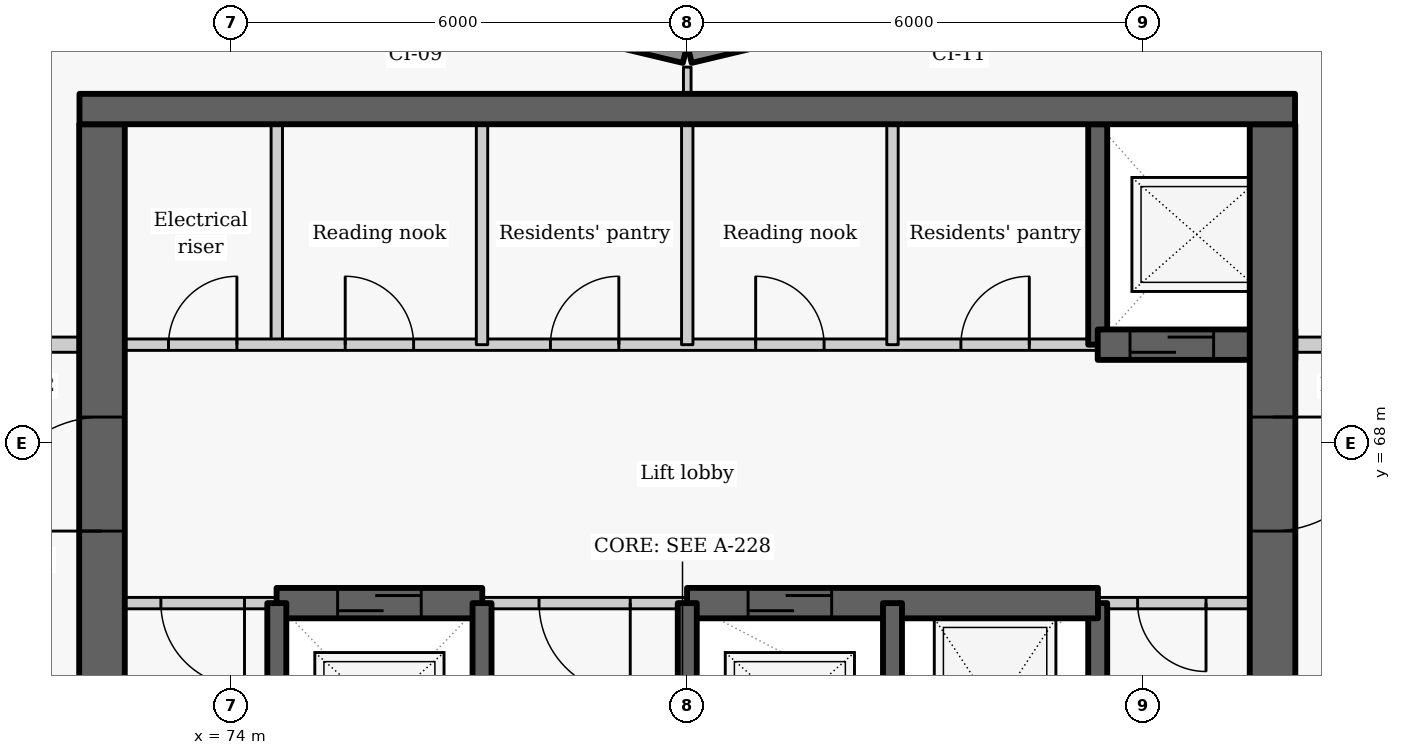
"""IFC4 building model, lengths in metres.
Left out: names, types, materials, properties, quantities, classifications, styles, units other than length and angle.
Written with IfcOpenShell. Run it as: python <this file> out.ifc"""

import sys

from ifc_helpers import new_model, si_unit, direction, frame, frame_2d, origin, place, context, subcontext, project, spatial, rectangle, extrude, element, fill, save


model = new_model("IFC4")
c1 = context("Model", 3, precision=1e-05, world=origin(), true_north=direction((0.0, 1.0)))
c2 = subcontext(c1, "Body", "Model", "MODEL_VIEW")
j1 = project(units=[si_unit("LENGTHUNIT", "METRE"), si_unit("PLANEANGLEUNIT", "RADIAN")], contexts=[c1])
p1 = place(None, origin())
s1 = spatial("IfcSite", under=j1, at=p1, CompositionType="ELEMENT")
p2 = place(p1, origin())
s2 = spatial("IfcBuilding", under=s1, at=p2, CompositionType="ELEMENT")
p3 = place(p2, frame((0.0, 0.0, 160.2)))
s3 = spatial("IfcBuildingStorey", under=s2, at=p3, CompositionType="ELEMENT", Elevation=160.2)
p4 = place(p3, frame((83.186, 73.881, 0.0), z_axis=(0.0, 0.0, 1.0), x_axis=(-0.972773113459, -0.231759508395, 0.0)))
e1 = element("IfcWall", 1, at=p4, inside=s3, PredefinedType="SOLIDWALL", context=c2, shape_type="SweptSolid", body=[
    extrude(rectangle(XDim=3.246, YDim=0.25, at=frame_2d((1.623, 0.0))), origin(), (0.0, 0.0, 1.0), 2.425),
])
p5 = place(p4, frame((0.573, 0.0, 0.9)))
e2 = element("IfcOpeningElement", 2, at=p5, cuts=e1, PredefinedType="OPENING", context=c2, shape_type="SweptSolid", body=[
    extrude(rectangle(XDim=2.1, YDim=1.1, at=frame_2d((1.05, 0.55))), frame((0.0, 0.135, 0.0), z_axis=(0.0, -1.0, 0.0), x_axis=(1.0, 0.0, 0.0)), (0.0, 0.0, 1.0), 0.27),
])
p6 = place(p3, frame((79.971, 73.128, 0.0), z_axis=(0.0, 0.0, 1.0), x_axis=(-0.972773113459, 0.231759508395, 0.0)))
e3 = element("IfcWall", 3, at=p6, inside=s3, PredefinedType="SOLIDWALL", context=c2, shape_type="SweptSolid", body=[
    extrude(rectangle(XDim=3.246, YDim=0.25, at=frame_2d((1.623, 0.0))), origin(), (0.0, 0.0, 1.0), 2.425),
])
p7 = place(p6, frame((0.573, 0.0, 0.9)))
e4 = element("IfcOpeningElement", 4, at=p7, cuts=e3, PredefinedType="OPENING", context=c2, shape_type="SweptSolid", body=[
    extrude(rectangle(XDim=2.1, YDim=1.1, at=frame_2d((1.05, 0.55))), frame((0.0, 0.135, 0.0), z_axis=(0.0, -1.0, 0.0), x_axis=(1.0, 0.0, 0.0)), (0.0, 0.0, 1.0), 0.27),
])
p8 = place(p3, frame((74.6, 69.3, 0.0), z_axis=(0.0, 0.0, 1.0), x_axis=(0.0, 1.0, 0.0)))
e5 = element("IfcWall", 5, at=p8, inside=s3, PredefinedType="PARTITIONING", context=c2, shape_type="SweptSolid", body=[
    extrude(rectangle(XDim=2.9, YDim=0.15, at=frame_2d((1.45, 0.0))), origin(), (0.0, 0.0, 1.0), 3.025),
])
p9 = place(p3, frame((72.0, 69.3, 0.0), z_axis=(0.0, 0.0, 1.0), x_axis=(1.0, 0.0, 0.0)))
e6 = element("IfcWall", 6, at=p9, inside=s3, PredefinedType="PARTITIONING", context=c2, shape_type="SweptSolid", body=[
    extrude(rectangle(XDim=13.4, YDim=0.15, at=frame_2d((6.7, 0.0))), origin(), (0.0, 0.0, 1.0), 3.025),
])
p10 = place(p9, frame((1.175, 0.0, 0.0)))
e7 = element("IfcOpeningElement", 7, at=p10, cuts=e6, PredefinedType="OPENING", context=c2, shape_type="SweptSolid", body=[
    extrude(rectangle(XDim=0.9, YDim=2.1, at=frame_2d((0.45, 1.05))), frame((0.0, 0.085, 0.0), z_axis=(0.0, -1.0, 0.0), x_axis=(1.0, 0.0, 0.0)), (0.0, 0.0, 1.0), 0.17),
])
p11 = place(p9, frame((3.5, 0.0, 0.0)))
e8 = element("IfcOpeningElement", 8, at=p11, cuts=e6, PredefinedType="OPENING", context=c2, shape_type="SweptSolid", body=[
    extrude(rectangle(XDim=0.9, YDim=2.1, at=frame_2d((0.45, 1.05))), frame((0.0, 0.085, 0.0), z_axis=(0.0, -1.0, 0.0), x_axis=(1.0, 0.0, 0.0)), (0.0, 0.0, 1.0), 0.17),
])
p12 = place(p9, frame((6.2, 0.0, 0.0)))
e9 = element("IfcOpeningElement", 9, at=p12, cuts=e6, PredefinedType="OPENING", context=c2, shape_type="SweptSolid", body=[
    extrude(rectangle(XDim=0.9, YDim=2.1, at=frame_2d((0.45, 1.05))), frame((0.0, 0.085, 0.0), z_axis=(0.0, -1.0, 0.0), x_axis=(1.0, 0.0, 0.0)), (0.0, 0.0, 1.0), 0.17),
])
p13 = place(p9, frame((8.9, 0.0, 0.0)))
e10 = element("IfcOpeningElement", 10, at=p13, cuts=e6, PredefinedType="OPENING", context=c2, shape_type="SweptSolid", body=[
    extrude(rectangle(XDim=0.9, YDim=2.1, at=frame_2d((0.45, 1.05))), frame((0.0, 0.085, 0.0), z_axis=(0.0, -1.0, 0.0), x_axis=(1.0, 0.0, 0.0)), (0.0, 0.0, 1.0), 0.17),
])
p14 = place(p9, frame((11.6, 0.0, 0.0)))
e11 = element("IfcOpeningElement", 11, at=p14, cuts=e6, PredefinedType="OPENING", context=c2, shape_type="SweptSolid", body=[
    extrude(rectangle(XDim=0.9, YDim=2.1, at=frame_2d((0.45, 1.05))), frame((0.0, 0.085, 0.0), z_axis=(0.0, -1.0, 0.0), x_axis=(1.0, 0.0, 0.0)), (0.0, 0.0, 1.0), 0.17),
])
p15 = place(p3, frame((72.3, 63.1, -0.275), z_axis=(0.0, 0.0, 1.0), x_axis=(0.0, 1.0, 0.0)))
e12 = element("IfcWall", 12, at=p15, inside=s3, PredefinedType="SHEAR", context=c2, shape_type="SweptSolid", body=[
    extrude(rectangle(XDim=9.1, YDim=0.6, at=frame_2d((4.55, 0.0))), origin(), (0.0, 0.0, 1.0), 3.3),
])
p16 = place(p15, frame((3.748, 0.0, 0.275)))
e13 = element("IfcOpeningElement", 13, at=p16, cuts=e12, PredefinedType="OPENING", context=c2, shape_type="SweptSolid", body=[
    extrude(rectangle(XDim=1.5, YDim=2.1, at=frame_2d((0.75, 1.05))), frame((0.0, 0.31, 0.0), z_axis=(0.0, -1.0, 0.0), x_axis=(1.0, 0.0, 0.0)), (0.0, 0.0, 1.0), 0.62),
])
p17 = place(p3, frame((85.4, 63.1, -0.275), z_axis=(0.0, 0.0, 1.0), x_axis=(0.0, 1.0, 0.0)))
e14 = element("IfcWall", 14, at=p17, inside=s3, PredefinedType="SHEAR", context=c2, shape_type="SweptSolid", body=[
    extrude(rectangle(XDim=2.8, YDim=0.25, at=frame_2d((1.4, 0.0))), origin(), (0.0, 0.0, 1.0), 3.3),
])
p18 = place(p3, frame((85.4, 69.3, -0.275), z_axis=(0.0, 0.0, 1.0), x_axis=(0.0, 1.0, 0.0)))
e15 = element("IfcWall", 15, at=p18, inside=s3, PredefinedType="SHEAR", context=c2, shape_type="SweptSolid", body=[
    extrude(rectangle(XDim=2.9, YDim=0.25, at=frame_2d((1.45, 0.0))), origin(), (0.0, 0.0, 1.0), 3.3),
])
p19 = place(p3, frame((85.4, 69.3, -0.275), z_axis=(0.0, 0.0, 1.0), x_axis=(1.0, 0.0, 0.0)))
e16 = element("IfcWall", 16, at=p19, inside=s3, PredefinedType="SHEAR", context=c2, shape_type="SweptSolid", body=[
    extrude(rectangle(XDim=2.6, YDim=0.4, at=frame_2d((1.3, 0.0))), origin(), (0.0, 0.0, 1.0), 3.3),
])
p20 = place(p19, frame((0.425, 0.0, 0.275)))
e17 = element("IfcOpeningElement", 17, at=p20, cuts=e16, PredefinedType="OPENING", context=c2, shape_type="SweptSolid", body=[
    extrude(rectangle(XDim=1.1, YDim=2.1, at=frame_2d((0.55, 1.05))), frame((0.0, 0.21, 0.0), z_axis=(0.0, -1.0, 0.0), x_axis=(1.0, 0.0, 0.0)), (0.0, 0.0, 1.0), 0.42),
])
p21 = place(p3, frame((87.7, 72.2, -0.275), z_axis=(0.0, 0.0, 1.0), x_axis=(0.0, -1.0, 0.0)))
e18 = element("IfcWall", 18, at=p21, inside=s3, PredefinedType="SHEAR", context=c2, shape_type="SweptSolid", body=[
    extrude(rectangle(XDim=15.6, YDim=0.6, at=frame_2d((7.8, 0.0))), origin(), (0.0, 0.0, 1.0), 3.3),
])
p22 = place(p21, frame((3.852, 0.0, 0.275)))
e19 = element("IfcOpeningElement", 19, at=p22, cuts=e18, PredefinedType="OPENING", context=c2, shape_type="SweptSolid", body=[
    extrude(rectangle(XDim=1.5, YDim=2.1, at=frame_2d((0.75, 1.05))), frame((0.0, 0.31, 0.0), z_axis=(0.0, -1.0, 0.0), x_axis=(1.0, 0.0, 0.0)), (0.0, 0.0, 1.0), 0.62),
])
for number, where, z_axis, x_axis in (
    (20, (77.3, 69.3, 0.0), (0.0, 0.0, 1.0), (0.0, 1.0, 0.0)),
    (21, (80.0, 69.3, 0.0), (0.0, 0.0, 1.0), (0.0, 1.0, 0.0)),
    (22, (82.7, 69.3, 0.0), (0.0, 0.0, 1.0), (0.0, 1.0, 0.0)),
):
    element("IfcWall", number, at=place(p3, frame(where, z_axis=z_axis, x_axis=x_axis)), inside=s3, PredefinedType="PARTITIONING", context=c2, shape_type="SweptSolid", body=[
        extrude(rectangle(XDim=2.9, YDim=0.15, at=frame_2d((1.45, 0.0))), origin(), (0.0, 0.0, 1.0), 3.025),
    ])
p23 = place(p3, frame((74.603, 65.9, 0.0), z_axis=(0.0, 0.0, 1.0), x_axis=(-1.0, 0.0, 0.0)))
e23 = element("IfcWall", 23, at=p23, inside=s3, PredefinedType="PARTITIONING", context=c2, shape_type="SweptSolid", body=[
    extrude(rectangle(XDim=2.603, YDim=0.15, at=frame_2d((1.302, 0.0))), origin(), (0.0, 0.0, 1.0), 3.025),
])
p24 = place(p23, frame((0.428, 0.0, 0.0)))
e24 = element("IfcOpeningElement", 24, at=p24, cuts=e23, PredefinedType="OPENING", context=c2, shape_type="SweptSolid", body=[
    extrude(rectangle(XDim=1.1, YDim=2.1, at=frame_2d((0.55, 1.05))), frame((0.0, 0.085, 0.0), z_axis=(0.0, -1.0, 0.0), x_axis=(1.0, 0.0, 0.0)), (0.0, 0.0, 1.0), 0.17),
])
p25 = place(p3, frame((80.003, 65.9, 0.0), z_axis=(0.0, 0.0, 1.0), x_axis=(-1.0, 0.0, 0.0)))
e25 = element("IfcWall", 25, at=p25, inside=s3, PredefinedType="PARTITIONING", context=c2, shape_type="SweptSolid", body=[
    extrude(rectangle(XDim=2.706, YDim=0.15, at=frame_2d((1.353, 0.0))), origin(), (0.0, 0.0, 1.0), 3.025),
])
p26 = place(p25, frame((0.753, 0.0, 0.0)))
e26 = element("IfcOpeningElement", 26, at=p26, cuts=e25, PredefinedType="OPENING", context=c2, shape_type="SweptSolid", body=[
    extrude(rectangle(XDim=1.2, YDim=2.1, at=frame_2d((0.6, 1.05))), frame((0.0, 0.085, 0.0), z_axis=(0.0, -1.0, 0.0), x_axis=(1.0, 0.0, 0.0)), (0.0, 0.0, 1.0), 0.17),
])
p27 = place(p3, frame((88.0, 65.9, 0.0), z_axis=(0.0, 0.0, 1.0), x_axis=(-1.0, 0.0, 0.0)))
e27 = element("IfcWall", 27, at=p27, inside=s3, PredefinedType="PARTITIONING", context=c2, shape_type="SweptSolid", body=[
    extrude(rectangle(XDim=2.603, YDim=0.15, at=frame_2d((1.302, 0.0))), origin(), (0.0, 0.0, 1.0), 3.025),
])
p28 = place(p27, frame((1.175, 0.0, 0.0)))
e28 = element("IfcOpeningElement", 28, at=p28, cuts=e27, PredefinedType="OPENING", context=c2, shape_type="SweptSolid", body=[
    extrude(rectangle(XDim=0.9, YDim=2.1, at=frame_2d((0.45, 1.05))), frame((0.0, 0.085, 0.0), z_axis=(0.0, -1.0, 0.0), x_axis=(1.0, 0.0, 0.0)), (0.0, 0.0, 1.0), 0.17),
])
p29 = place(p3, frame((74.597, 65.9, -0.275), z_axis=(0.0, 0.0, 1.0), x_axis=(1.0, 0.0, 0.0)))
e29 = element("IfcWall", 29, at=p29, inside=s3, PredefinedType="SHEAR", context=c2, shape_type="SweptSolid", body=[
    extrude(rectangle(XDim=2.706, YDim=0.4, at=frame_2d((1.353, 0.0))), origin(), (0.0, 0.0, 1.0), 3.3),
])
p30 = place(p29, frame((0.803, 0.0, 0.275)))
e30 = element("IfcOpeningElement", 30, at=p30, cuts=e29, PredefinedType="OPENING", context=c2, shape_type="SweptSolid", body=[
    extrude(rectangle(XDim=1.1, YDim=2.1, at=frame_2d((0.55, 1.05))), frame((0.0, 0.21, 0.0), z_axis=(0.0, -1.0, 0.0), x_axis=(1.0, 0.0, 0.0)), (0.0, 0.0, 1.0), 0.42),
])
p31 = place(p3, frame((79.997, 65.9, -0.275), z_axis=(0.0, 0.0, 1.0), x_axis=(1.0, 0.0, 0.0)))
e31 = element("IfcWall", 31, at=p31, inside=s3, PredefinedType="SHEAR", context=c2, shape_type="SweptSolid", body=[
    extrude(rectangle(XDim=5.406, YDim=0.4, at=frame_2d((2.703, 0.0))), origin(), (0.0, 0.0, 1.0), 3.3),
])
p32 = place(p31, frame((0.803, 0.0, 0.275)))
e32 = element("IfcOpeningElement", 32, at=p32, cuts=e31, PredefinedType="OPENING", context=c2, shape_type="SweptSolid", body=[
    extrude(rectangle(XDim=1.1, YDim=2.1, at=frame_2d((0.55, 1.05))), frame((0.0, 0.21, 0.0), z_axis=(0.0, -1.0, 0.0), x_axis=(1.0, 0.0, 0.0)), (0.0, 0.0, 1.0), 0.42),
])
for number, where, z_axis, x_axis in (
    (33, (74.6, 63.1, -0.275), (0.0, 0.0, 1.0), (0.0, 1.0, 0.0)),
    (34, (77.3, 63.1, -0.275), (0.0, 0.0, 1.0), (0.0, 1.0, 0.0)),
    (35, (80.0, 63.1, -0.275), (0.0, 0.0, 1.0), (0.0, 1.0, 0.0)),
    (36, (82.7, 63.1, -0.275), (0.0, 0.0, 1.0), (0.0, 1.0, 0.0)),
):
    element("IfcWall", number, at=place(p3, frame(where, z_axis=z_axis, x_axis=x_axis)), inside=s3, PredefinedType="SHEAR", context=c2, shape_type="SweptSolid", body=[
        extrude(rectangle(XDim=2.8, YDim=0.25, at=frame_2d((1.4, 0.0))), origin(), (0.0, 0.0, 1.0), 3.3),
    ])
for number, where, z_axis, x_axis in (
    (37, (70.45, 69.3, 0.0), (0.0, 0.0, 1.0), (1.0, 0.0, 0.0)),
    (38, (88.0, 69.3, 0.0), (0.0, 0.0, 1.0), (1.0, 0.0, 0.0)),
):
    element("IfcWall", number, at=place(p3, frame(where, z_axis=z_axis, x_axis=x_axis)), inside=s3, PredefinedType="PARTITIONING", context=c2, shape_type="SweptSolid", body=[
        extrude(rectangle(XDim=1.55, YDim=0.2, at=frame_2d((0.775, 0.0))), origin(), (0.0, 0.0, 1.0), 3.025),
    ])
p33 = place(p3, frame((80.0, 72.6, 0.0), z_axis=(0.0, 0.0, 1.0), x_axis=(0.0, 1.0, 0.0)))
e39 = element("IfcWall", 39, at=p33, inside=s3, PredefinedType="PARTITIONING", context=c2, shape_type="SweptSolid", body=[
    extrude(rectangle(XDim=0.352, YDim=0.1, at=frame_2d((0.176, 0.0))), origin(), (0.0, 0.0, 1.0), 3.025),
])
p34 = place(p3, frame((72.004, 72.4, -0.275), z_axis=(0.0, 0.0, 1.0), x_axis=(1.0, 0.0, 0.0)))
e40 = element("IfcWall", 40, at=p34, inside=s3, PredefinedType="SHEAR", context=c2, shape_type="SweptSolid", body=[
    extrude(rectangle(XDim=15.992, YDim=0.4, at=frame_2d((7.996, 0.0))), origin(), (0.0, 0.0, 1.0), 3.3),
])
p35 = place(p10, origin())
e41 = element("IfcDoor", 41, at=p35, inside=s3, OperationType="SINGLE_SWING_RIGHT", PredefinedType="DOOR", context=c2, shape_type="SweptSolid", body=[
    extrude(rectangle(XDim=0.9, YDim=2.1, at=frame_2d((0.45, 1.05))), frame((0.0, 0.025, 0.0), z_axis=(0.0, -1.0, 0.0), x_axis=(1.0, 0.0, 0.0)), (0.0, 0.0, 1.0), 0.05),
])
fill(e7, e41)
p36 = place(p20, origin())
e42 = element("IfcDoor", 42, at=p36, inside=s3, OperationType="SLIDING_TO_LEFT", PredefinedType="DOOR", context=c2, shape_type="SweptSolid", body=[
    extrude(rectangle(XDim=1.1, YDim=2.1, at=frame_2d((0.55, 1.05))), frame((0.0, 0.025, 0.0), z_axis=(0.0, -1.0, 0.0), x_axis=(1.0, 0.0, 0.0)), (0.0, 0.0, 1.0), 0.05),
])
fill(e17, e42)
p37 = place(p11, origin())
e43 = element("IfcDoor", 43, at=p37, inside=s3, OperationType="SINGLE_SWING_LEFT", PredefinedType="DOOR", context=c2, shape_type="SweptSolid", body=[
    extrude(rectangle(XDim=0.9, YDim=2.1, at=frame_2d((0.45, 1.05))), frame((0.0, 0.025, 0.0), z_axis=(0.0, -1.0, 0.0), x_axis=(1.0, 0.0, 0.0)), (0.0, 0.0, 1.0), 0.05),
])
fill(e8, e43)
p38 = place(p12, origin())
e44 = element("IfcDoor", 44, at=p38, inside=s3, OperationType="SINGLE_SWING_RIGHT", PredefinedType="DOOR", context=c2, shape_type="SweptSolid", body=[
    extrude(rectangle(XDim=0.9, YDim=2.1, at=frame_2d((0.45, 1.05))), frame((0.0, 0.025, 0.0), z_axis=(0.0, -1.0, 0.0), x_axis=(1.0, 0.0, 0.0)), (0.0, 0.0, 1.0), 0.05),
])
fill(e9, e44)
p39 = place(p13, origin())
e45 = element("IfcDoor", 45, at=p39, inside=s3, OperationType="SINGLE_SWING_LEFT", PredefinedType="DOOR", context=c2, shape_type="SweptSolid", body=[
    extrude(rectangle(XDim=0.9, YDim=2.1, at=frame_2d((0.45, 1.05))), frame((0.0, 0.025, 0.0), z_axis=(0.0, -1.0, 0.0), x_axis=(1.0, 0.0, 0.0)), (0.0, 0.0, 1.0), 0.05),
])
fill(e10, e45)
p40 = place(p14, origin())
e46 = element("IfcDoor", 46, at=p40, inside=s3, OperationType="SINGLE_SWING_RIGHT", PredefinedType="DOOR", context=c2, shape_type="SweptSolid", body=[
    extrude(rectangle(XDim=0.9, YDim=2.1, at=frame_2d((0.45, 1.05))), frame((0.0, 0.025, 0.0), z_axis=(0.0, -1.0, 0.0), x_axis=(1.0, 0.0, 0.0)), (0.0, 0.0, 1.0), 0.05),
])
fill(e11, e46)
p41 = place(p24, origin())
e47 = element("IfcDoor", 47, at=p41, inside=s3, OperationType="SINGLE_SWING_LEFT", PredefinedType="DOOR", context=c2, shape_type="SweptSolid", body=[
    extrude(rectangle(XDim=1.1, YDim=2.1, at=frame_2d((0.55, 1.05))), frame((0.0, 0.025, 0.0), z_axis=(0.0, -1.0, 0.0), x_axis=(1.0, 0.0, 0.0)), (0.0, 0.0, 1.0), 0.05),
])
fill(e24, e47)
p42 = place(p30, origin())
e48 = element("IfcDoor", 48, at=p42, inside=s3, OperationType="SLIDING_TO_LEFT", PredefinedType="DOOR", context=c2, shape_type="SweptSolid", body=[
    extrude(rectangle(XDim=1.1, YDim=2.1, at=frame_2d((0.55, 1.05))), frame((0.0, 0.025, 0.0), z_axis=(0.0, -1.0, 0.0), x_axis=(1.0, 0.0, 0.0)), (0.0, 0.0, 1.0), 0.05),
])
fill(e30, e48)
p43 = place(p26, origin())
e49 = element("IfcDoor", 49, at=p43, inside=s3, OperationType="DOUBLE_DOOR_SINGLE_SWING", PredefinedType="DOOR", context=c2, shape_type="SweptSolid", body=[
    extrude(rectangle(XDim=1.2, YDim=2.1, at=frame_2d((0.6, 1.05))), frame((0.0, 0.025, 0.0), z_axis=(0.0, -1.0, 0.0), x_axis=(1.0, 0.0, 0.0)), (0.0, 0.0, 1.0), 0.05),
])
fill(e26, e49)
p44 = place(p32, origin())
e50 = element("IfcDoor", 50, at=p44, inside=s3, OperationType="SLIDING_TO_LEFT", PredefinedType="DOOR", context=c2, shape_type="SweptSolid", body=[
    extrude(rectangle(XDim=1.1, YDim=2.1, at=frame_2d((0.55, 1.05))), frame((0.0, 0.025, 0.0), z_axis=(0.0, -1.0, 0.0), x_axis=(1.0, 0.0, 0.0)), (0.0, 0.0, 1.0), 0.05),
])
fill(e32, e50)
p45 = place(p28, origin())
e51 = element("IfcDoor", 51, at=p45, inside=s3, OperationType="SINGLE_SWING_LEFT", PredefinedType="DOOR", context=c2, shape_type="SweptSolid", body=[
    extrude(rectangle(XDim=0.9, YDim=2.1, at=frame_2d((0.45, 1.05))), frame((0.0, 0.025, 0.0), z_axis=(0.0, -1.0, 0.0), x_axis=(1.0, 0.0, 0.0)), (0.0, 0.0, 1.0), 0.05),
])
fill(e28, e51)
p46 = place(p22, origin())
e52 = element("IfcDoor", 52, at=p46, inside=s3, OperationType="DOUBLE_DOOR_SINGLE_SWING", PredefinedType="DOOR", context=c2, shape_type="SweptSolid", body=[
    extrude(rectangle(XDim=1.5, YDim=2.1, at=frame_2d((0.75, 1.05))), frame((0.0, 0.025, 0.0), z_axis=(0.0, -1.0, 0.0), x_axis=(1.0, 0.0, 0.0)), (0.0, 0.0, 1.0), 0.05),
])
fill(e19, e52)
p47 = place(p16, origin())
e53 = element("IfcDoor", 53, at=p47, inside=s3, OperationType="DOUBLE_DOOR_SINGLE_SWING", PredefinedType="DOOR", context=c2, shape_type="SweptSolid", body=[
    extrude(rectangle(XDim=1.5, YDim=2.1, at=frame_2d((0.75, 1.05))), frame((0.0, 0.025, 0.0), z_axis=(0.0, -1.0, 0.0), x_axis=(1.0, 0.0, 0.0)), (0.0, 0.0, 1.0), 0.05),
])
fill(e13, e53)
save(model, sys.argv[1])
